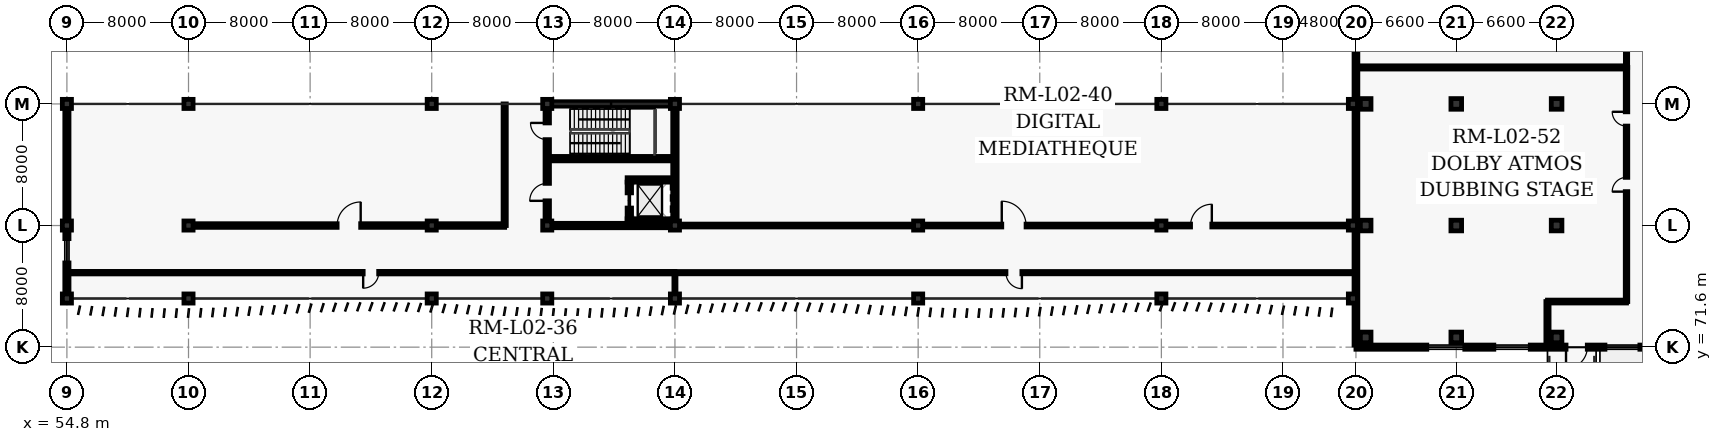
"""IFC4 building model, lengths in metres.
Left out: names, types, materials, properties, quantities, classifications, styles, units other than length and angle.
Written with IfcOpenShell. Run it as: python <this file> out.ifc"""

import sys

from ifc_helpers import new_model, si_unit, direction, frame, frame_2d, origin, origin_2d, place, context, subcontext, project, spatial, rectangle, extrude, element, fill, save


model = new_model("IFC4")
c1 = context("Model", 3, precision=1e-05, world=origin(), true_north=direction((0.0, 1.0)))
c2 = subcontext(c1, "Body", "Model", "MODEL_VIEW")
j1 = project(units=[si_unit("LENGTHUNIT", "METRE"), si_unit("PLANEANGLEUNIT", "RADIAN")], contexts=[c1])
p1 = place(None, origin())
s1 = spatial("IfcSite", under=j1, at=p1, CompositionType="ELEMENT")
p2 = place(p1, origin())
s2 = spatial("IfcBuilding", under=s1, at=p2, CompositionType="ELEMENT")
p3 = place(p2, frame((0.0, 0.0, 10.2)))
s3 = spatial("IfcBuildingStorey", under=s2, at=p3, CompositionType="ELEMENT", Elevation=10.2)
for number, where, z_axis, x_axis in (
    (1, (54.8, 74.8, 0.0), (0.0, 0.0, 1.0), (1.0, 0.0, 0.0)),
    (2, (54.8, 79.6, 0.0), (0.0, 0.0, 1.0), (1.0, 0.0, 0.0)),
    (3, (54.8, 87.6, 0.0), (0.0, 0.0, 1.0), (1.0, 0.0, 0.0)),
    (4, (62.8, 74.8, 0.0), (0.0, 0.0, 1.0), (1.0, 0.0, 0.0)),
    (5, (62.8, 79.6, 0.0), (0.0, 0.0, 1.0), (1.0, 0.0, 0.0)),
    (6, (62.8, 87.6, 0.0), (0.0, 0.0, 1.0), (1.0, 0.0, 0.0)),
    (7, (78.8, 74.8, 0.0), (0.0, 0.0, 1.0), (1.0, 0.0, 0.0)),
    (8, (78.8, 79.6, 0.0), (0.0, 0.0, 1.0), (1.0, 0.0, 0.0)),
    (9, (78.8, 87.6, 0.0), (0.0, 0.0, 1.0), (1.0, 0.0, 0.0)),
    (10, (86.4, 74.8, 0.0), (0.0, 0.0, 1.0), (1.0, 0.0, 0.0)),
    (11, (86.4, 79.6, 0.0), (0.0, 0.0, 1.0), (1.0, 0.0, 0.0)),
    (12, (86.4, 87.6, 0.0), (0.0, 0.0, 1.0), (1.0, 0.0, 0.0)),
    (13, (94.8, 74.8, 0.0), (0.0, 0.0, 1.0), (1.0, 0.0, 0.0)),
    (14, (94.8, 79.6, 0.0), (0.0, 0.0, 1.0), (1.0, 0.0, 0.0)),
    (15, (94.8, 87.6, 0.0), (0.0, 0.0, 1.0), (1.0, 0.0, 0.0)),
    (16, (110.8, 74.8, 0.0), (0.0, 0.0, 1.0), (1.0, 0.0, 0.0)),
    (17, (110.8, 79.6, 0.0), (0.0, 0.0, 1.0), (1.0, 0.0, 0.0)),
    (18, (110.8, 87.6, 0.0), (0.0, 0.0, 1.0), (1.0, 0.0, 0.0)),
    (19, (126.8, 74.8, 0.0), (0.0, 0.0, 1.0), (1.0, 0.0, 0.0)),
    (20, (126.8, 79.6, 0.0), (0.0, 0.0, 1.0), (1.0, 0.0, 0.0)),
    (21, (126.8, 87.6, 0.0), (0.0, 0.0, 1.0), (1.0, 0.0, 0.0)),
    (22, (139.4, 74.8, 0.0), (0.0, 0.0, 1.0), (1.0, 0.0, 0.0)),
    (23, (139.4, 79.6, 0.0), (0.0, 0.0, 1.0), (1.0, 0.0, 0.0)),
    (24, (139.4, 87.6, 0.0), (0.0, 0.0, 1.0), (1.0, 0.0, 0.0)),
):
    element("IfcColumn", number, at=place(p3, frame(where, z_axis=z_axis, x_axis=x_axis)), inside=s3, PredefinedType="COLUMN", context=c2, shape_type="SweptSolid", body=[
        extrude(rectangle(XDim=0.6, YDim=0.6, at=origin_2d()), origin(), (0.0, 0.0, 1.0), 5.4),
    ])
for number, where, z_axis, x_axis in (
    (25, (140.24, 72.24, 0.0), (0.0, 0.0, 1.0), (1.0, 0.0, 0.0)),
    (26, (140.24, 79.6, 0.0), (0.0, 0.0, 1.0), (1.0, 0.0, 0.0)),
    (27, (140.24, 87.6, 0.0), (0.0, 0.0, 1.0), (1.0, 0.0, 0.0)),
    (28, (146.2, 72.24, 0.0), (0.0, 0.0, 1.0), (1.0, 0.0, 0.0)),
    (29, (146.2, 79.6, 0.0), (0.0, 0.0, 1.0), (1.0, 0.0, 0.0)),
    (30, (146.2, 87.6, 0.0), (0.0, 0.0, 1.0), (1.0, 0.0, 0.0)),
    (31, (152.8, 72.24, 0.0), (0.0, 0.0, 1.0), (1.0, 0.0, 0.0)),
    (32, (152.8, 79.6, 0.0), (0.0, 0.0, 1.0), (1.0, 0.0, 0.0)),
    (33, (152.8, 87.6, 0.0), (0.0, 0.0, 1.0), (1.0, 0.0, 0.0)),
):
    element("IfcColumn", number, at=place(p3, frame(where, z_axis=z_axis, x_axis=x_axis)), inside=s3, PredefinedType="COLUMN", context=c2, shape_type="SweptSolid", body=[
        extrude(rectangle(XDim=0.7, YDim=0.7, at=origin_2d()), origin(), (0.0, 0.0, 1.0), 5.4),
    ])
p4 = place(p3, frame((54.8, 74.94, 0.0), z_axis=(0.0, 0.0, 1.0), x_axis=(0.0, 1.0, 0.0)))
e34 = element("IfcWall", 34, at=p4, inside=s3, PredefinedType="SOLIDWALL", context=c2, shape_type="SweptSolid", body=[
    extrude(rectangle(XDim=12.52, YDim=0.275, at=frame_2d((6.26, 0.0))), origin(), (0.0, 0.0, 1.0), 4.31),
])
p5 = place(p4, frame((2.2, 0.0, 0.8)))
e35 = element("IfcOpeningElement", 35, at=p5, cuts=e34, PredefinedType="OPENING", context=c2, shape_type="SweptSolid", body=[
    extrude(rectangle(XDim=1.6, YDim=1.65, at=frame_2d((0.8, 0.825))), frame((0.0, 0.147, 0.0), z_axis=(0.0, -1.0, 0.0), x_axis=(1.0, 0.0, 0.0)), (0.0, 0.0, 1.0), 0.295),
])
p6 = place(p3, frame((172.0, 71.6, 0.0), z_axis=(0.0, 0.0, 1.0), x_axis=(-1.0, 0.0, 0.0)))
e36 = element("IfcWall", 36, at=p6, inside=s3, PredefinedType="SOLIDWALL", context=c2, shape_type="SweptSolid", body=[
    extrude(rectangle(XDim=32.4, YDim=0.275, at=frame_2d((16.2, 0.0))), origin(), (0.0, 0.0, 1.0), 5.16),
])
p7 = place(p6, frame((7.96, 0.0, 0.8)))
e37 = element("IfcOpeningElement", 37, at=p7, cuts=e36, PredefinedType="OPENING", context=c2, shape_type="SweptSolid", body=[
    extrude(rectangle(XDim=2.2, YDim=2.25, at=frame_2d((1.1, 1.125))), frame((0.0, 0.147, 0.0), z_axis=(0.0, -1.0, 0.0), x_axis=(1.0, 0.0, 0.0)), (0.0, 0.0, 1.0), 0.295),
])
p8 = place(p6, frame((13.72, 0.0, 0.8)))
e38 = element("IfcOpeningElement", 38, at=p8, cuts=e36, PredefinedType="OPENING", context=c2, shape_type="SweptSolid", body=[
    extrude(rectangle(XDim=2.3, YDim=2.25, at=frame_2d((1.15, 1.125))), frame((0.0, 0.147, 0.0), z_axis=(0.0, -1.0, 0.0), x_axis=(1.0, 0.0, 0.0)), (0.0, 0.0, 1.0), 0.295),
])
p9 = place(p6, frame((20.93, 0.0, 0.8)))
e39 = element("IfcOpeningElement", 39, at=p9, cuts=e36, PredefinedType="OPENING", context=c2, shape_type="SweptSolid", body=[
    extrude(rectangle(XDim=2.4, YDim=2.3, at=frame_2d((1.2, 1.15))), frame((0.0, 0.147, 0.0), z_axis=(0.0, -1.0, 0.0), x_axis=(1.0, 0.0, 0.0)), (0.0, 0.0, 1.0), 0.295),
])
p10 = place(p6, frame((25.24, 0.0, 0.8)))
e40 = element("IfcOpeningElement", 40, at=p10, cuts=e36, PredefinedType="OPENING", context=c2, shape_type="SweptSolid", body=[
    extrude(rectangle(XDim=2.5, YDim=2.3, at=frame_2d((1.25, 1.15))), frame((0.0, 0.147, 0.0), z_axis=(0.0, -1.0, 0.0), x_axis=(1.0, 0.0, 0.0)), (0.0, 0.0, 1.0), 0.295),
])
p11 = place(p6, frame((17.18, 0.0, 0.0)))
e41 = element("IfcOpeningElement", 41, at=p11, cuts=e36, PredefinedType="OPENING", context=c2, shape_type="SweptSolid", body=[
    extrude(rectangle(XDim=1.4, YDim=2.25, at=frame_2d((0.7, 1.125))), frame((0.0, 0.147, 0.0), z_axis=(0.0, -1.0, 0.0), x_axis=(1.0, 0.0, 0.0)), (0.0, 0.0, 1.0), 0.295),
])
p12 = place(p3, frame((139.6, 71.74, 0.0), z_axis=(0.0, 0.0, 1.0), x_axis=(0.0, 1.0, 0.0)))
e42 = element("IfcWall", 42, at=p12, inside=s3, PredefinedType="SOLIDWALL", context=c2, shape_type="SweptSolid", body=[
    extrude(rectangle(XDim=46.12, YDim=0.25, at=frame_2d((23.06, 0.0))), origin(), (0.0, 0.0, 1.0), 4.31),
])
p13 = place(p12, frame((31.38, 0.0, 0.0)))
e43 = element("IfcOpeningElement", 43, at=p13, cuts=e42, PredefinedType="OPENING", context=c2, shape_type="SweptSolid", body=[
    extrude(rectangle(XDim=1.4, YDim=2.25, at=frame_2d((0.7, 1.125))), frame((0.0, 0.135, 0.0), z_axis=(0.0, -1.0, 0.0), x_axis=(1.0, 0.0, 0.0)), (0.0, 0.0, 1.0), 0.27),
])
for number, where, z_axis, x_axis in (
    (44, (86.702, 79.6, 0.0), (0.0, 0.0, 1.0), (1.0, 0.0, 0.0)),
    (45, (86.702, 87.6, 0.0), (0.0, 0.0, 1.0), (1.0, 0.0, 0.0)),
):
    element("IfcWall", number, at=place(p3, frame(where, z_axis=z_axis, x_axis=x_axis)), inside=s3, PredefinedType="SHEAR", context=c2, shape_type="SweptSolid", body=[
        extrude(rectangle(XDim=7.796, YDim=0.29, at=frame_2d((3.898, 0.0))), origin(), (0.0, 0.0, 1.0), 5.16),
    ])
p14 = place(p3, frame((86.4, 79.902, 0.0), z_axis=(0.0, 0.0, 1.0), x_axis=(0.0, 1.0, 0.0)))
e46 = element("IfcWall", 46, at=p14, inside=s3, PredefinedType="SHEAR", context=c2, shape_type="SweptSolid", body=[
    extrude(rectangle(XDim=7.396, YDim=0.29, at=frame_2d((3.698, 0.0))), origin(), (0.0, 0.0, 1.0), 5.16),
])
p15 = place(p14, frame((5.348, 0.0, 0.0)))
e47 = element("IfcOpeningElement", 47, at=p15, cuts=e46, PredefinedType="OPENING", context=c2, shape_type="SweptSolid", body=[
    extrude(rectangle(XDim=1.1, YDim=2.15, at=frame_2d((0.55, 1.075))), frame((0.0, 0.155, 0.0), z_axis=(0.0, -1.0, 0.0), x_axis=(1.0, 0.0, 0.0)), (0.0, 0.0, 1.0), 0.31),
])
p16 = place(p14, frame((1.323, 0.0, 0.0)))
e48 = element("IfcOpeningElement", 48, at=p16, cuts=e46, PredefinedType="OPENING", context=c2, shape_type="SweptSolid", body=[
    extrude(rectangle(XDim=1.15, YDim=2.2, at=frame_2d((0.575, 1.1))), frame((0.0, 0.155, 0.0), z_axis=(0.0, -1.0, 0.0), x_axis=(1.0, 0.0, 0.0)), (0.0, 0.0, 1.0), 0.31),
])
p17 = place(p3, frame((94.8, 79.902, 0.0), z_axis=(0.0, 0.0, 1.0), x_axis=(0.0, 1.0, 0.0)))
e49 = element("IfcWall", 49, at=p17, inside=s3, PredefinedType="SHEAR", context=c2, shape_type="SweptSolid", body=[
    extrude(rectangle(XDim=7.396, YDim=0.29, at=frame_2d((3.698, 0.0))), origin(), (0.0, 0.0, 1.0), 5.16),
])
p18 = place(p3, frame((86.545, 84.0, 0.0), z_axis=(0.0, 0.0, 1.0), x_axis=(1.0, 0.0, 0.0)))
e50 = element("IfcWall", 50, at=p18, inside=s3, PredefinedType="SHEAR", context=c2, shape_type="SweptSolid", body=[
    extrude(rectangle(XDim=8.11, YDim=0.29, at=frame_2d((4.055, 0.0))), origin(), (0.0, 0.0, 1.0), 5.16),
])
p19 = place(p3, frame((91.655, 79.9, 0.0), z_axis=(0.0, 0.0, 1.0), x_axis=(1.0, 0.0, 0.0)))
e51 = element("IfcWall", 51, at=p19, inside=s3, PredefinedType="SHEAR", context=c2, shape_type="SweptSolid", body=[
    extrude(rectangle(XDim=2.843, YDim=0.29, at=frame_2d((1.421, 0.0))), origin(), (0.0, 0.0, 1.0), 5.16),
])
p20 = place(p3, frame((91.655, 82.6, 0.0), z_axis=(0.0, 0.0, 1.0), x_axis=(1.0, 0.0, 0.0)))
e52 = element("IfcWall", 52, at=p20, inside=s3, PredefinedType="SHEAR", context=c2, shape_type="SweptSolid", body=[
    extrude(rectangle(XDim=2.99, YDim=0.29, at=frame_2d((1.495, 0.0))), origin(), (0.0, 0.0, 1.0), 5.16),
])
p21 = place(p3, frame((91.8, 80.045, 0.0), z_axis=(0.0, 0.0, 1.0), x_axis=(0.0, 1.0, 0.0)))
e53 = element("IfcWall", 53, at=p21, inside=s3, PredefinedType="SHEAR", context=c2, shape_type="SweptSolid", body=[
    extrude(rectangle(XDim=2.41, YDim=0.29, at=frame_2d((1.205, 0.0))), origin(), (0.0, 0.0, 1.0), 5.16),
])
p22 = place(p21, frame((0.705, 0.0, 0.0)))
e54 = element("IfcOpeningElement", 54, at=p22, cuts=e53, PredefinedType="OPENING", context=c2, shape_type="SweptSolid", body=[
    extrude(rectangle(XDim=1.0, YDim=2.15, at=frame_2d((0.5, 1.075))), frame((0.0, 0.155, 0.0), z_axis=(0.0, -1.0, 0.0), x_axis=(1.0, 0.0, 0.0)), (0.0, 0.0, 1.0), 0.31),
])
p23 = place(p3, frame((94.8, 76.5, 0.0), z_axis=(0.0, 0.0, 1.0), x_axis=(-1.0, 0.0, 0.0)))
e55 = element("IfcWall", 55, at=p23, inside=s3, PredefinedType="PARTITIONING", context=c2, shape_type="SweptSolid", body=[
    extrude(rectangle(XDim=40.0, YDim=0.165, at=frame_2d((20.0, 0.0))), origin(), (0.0, 0.0, 1.0), 5.16),
])
p24 = place(p23, frame((19.49, 0.0, 0.0)))
e56 = element("IfcOpeningElement", 56, at=p24, cuts=e55, PredefinedType="OPENING", context=c2, shape_type="SweptSolid", body=[
    extrude(rectangle(XDim=1.02, YDim=2.1, at=frame_2d((0.51, 1.05))), frame((0.0, 0.093, 0.0), z_axis=(0.0, -1.0, 0.0), x_axis=(1.0, 0.0, 0.0)), (0.0, 0.0, 1.0), 0.185),
])
p25 = place(p3, frame((139.4, 76.5, 0.0), z_axis=(0.0, 0.0, 1.0), x_axis=(-1.0, 0.0, 0.0)))
e57 = element("IfcWall", 57, at=p25, inside=s3, PredefinedType="PARTITIONING", context=c2, shape_type="SweptSolid", body=[
    extrude(rectangle(XDim=44.6, YDim=0.15, at=frame_2d((22.3, 0.0))), origin(), (0.0, 0.0, 1.0), 5.16),
])
p26 = place(p25, frame((21.775, 0.0, 0.0)))
e58 = element("IfcOpeningElement", 58, at=p26, cuts=e57, PredefinedType="OPENING", context=c2, shape_type="SweptSolid", body=[
    extrude(rectangle(XDim=1.05, YDim=2.15, at=frame_2d((0.525, 1.075))), frame((0.0, 0.085, 0.0), z_axis=(0.0, -1.0, 0.0), x_axis=(1.0, 0.0, 0.0)), (0.0, 0.0, 1.0), 0.17),
])
p27 = place(p3, frame((63.102, 79.6, 0.0), z_axis=(0.0, 0.0, 1.0), x_axis=(1.0, 0.0, 0.0)))
e59 = element("IfcWall", 59, at=p27, inside=s3, PredefinedType="PARTITIONING", context=c2, shape_type="SweptSolid", body=[
    extrude(rectangle(XDim=20.498, YDim=0.24, at=frame_2d((10.249, 0.0))), origin(), (0.0, 0.0, 1.0), 4.797),
])
p28 = place(p27, frame((9.474, 0.0, 0.0)))
e60 = element("IfcOpeningElement", 60, at=p28, cuts=e59, PredefinedType="OPENING", context=c2, shape_type="SweptSolid", body=[
    extrude(rectangle(XDim=1.55, YDim=2.25, at=frame_2d((0.775, 1.125))), frame((0.0, 0.13, 0.0), z_axis=(0.0, -1.0, 0.0), x_axis=(1.0, 0.0, 0.0)), (0.0, 0.0, 1.0), 0.26),
])
p29 = place(p3, frame((83.6, 79.6, 0.0), z_axis=(0.0, 0.0, 1.0), x_axis=(0.0, 1.0, 0.0)))
e61 = element("IfcWall", 61, at=p29, inside=s3, PredefinedType="PARTITIONING", context=c2, shape_type="SweptSolid", body=[
    extrude(rectangle(XDim=8.0, YDim=0.21, at=frame_2d((4.0, 0.0))), origin(), (0.0, 0.0, 1.0), 5.16),
])
p30 = place(p3, frame((95.102, 79.6, 0.0), z_axis=(0.0, 0.0, 1.0), x_axis=(1.0, 0.0, 0.0)))
e62 = element("IfcWall", 62, at=p30, inside=s3, PredefinedType="PARTITIONING", context=c2, shape_type="SweptSolid", body=[
    extrude(rectangle(XDim=43.996, YDim=0.19, at=frame_2d((21.998, 0.0))), origin(), (0.0, 0.0, 1.0), 4.51),
])
p31 = place(p30, frame((21.198, 0.0, 0.0)))
e63 = element("IfcOpeningElement", 63, at=p31, cuts=e62, PredefinedType="OPENING", context=c2, shape_type="SweptSolid", body=[
    extrude(rectangle(XDim=1.6, YDim=2.3, at=frame_2d((0.8, 1.15))), frame((0.0, 0.105, 0.0), z_axis=(0.0, -1.0, 0.0), x_axis=(1.0, 0.0, 0.0)), (0.0, 0.0, 1.0), 0.21),
])
p32 = place(p30, frame((33.617, 0.0, 0.0)))
e64 = element("IfcOpeningElement", 64, at=p32, cuts=e62, PredefinedType="OPENING", context=c2, shape_type="SweptSolid", body=[
    extrude(rectangle(XDim=1.4, YDim=2.25, at=frame_2d((0.7, 1.125))), frame((0.0, 0.105, 0.0), z_axis=(0.0, -1.0, 0.0), x_axis=(1.0, 0.0, 0.0)), (0.0, 0.0, 1.0), 0.21),
])
p33 = place(p3, frame((94.8, 76.5, 0.0), z_axis=(0.0, 0.0, 1.0), x_axis=(0.0, -1.0, 0.0)))
e65 = element("IfcWall", 65, at=p33, inside=s3, PredefinedType="PARTITIONING", context=c2, shape_type="SweptSolid", body=[
    extrude(rectangle(XDim=1.398, YDim=0.135, at=frame_2d((0.699, 0.0))), origin(), (0.0, 0.0, 1.0), 4.41),
])
p34 = place(p3, frame((152.2, 71.6, 0.0), z_axis=(0.0, 0.0, 1.0), x_axis=(0.0, 1.0, 0.0)))
e66 = element("IfcWall", 66, at=p34, inside=s3, PredefinedType="PARTITIONING", context=c2, shape_type="SweptSolid", body=[
    extrude(rectangle(XDim=3.0, YDim=0.21, at=frame_2d((1.5, 0.0))), origin(), (0.0, 0.0, 1.0), 5.16),
])
p35 = place(p3, frame((152.2, 74.6, 0.0), z_axis=(0.0, 0.0, 1.0), x_axis=(1.0, 0.0, 0.0)))
e67 = element("IfcWall", 67, at=p35, inside=s3, PredefinedType="PARTITIONING", context=c2, shape_type="SweptSolid", body=[
    extrude(rectangle(XDim=5.2, YDim=0.19, at=frame_2d((2.6, 0.0))), origin(), (0.0, 0.0, 1.0), 5.16),
])
p36 = place(p3, frame((157.4, 74.6, 0.0), z_axis=(0.0, 0.0, 1.0), x_axis=(0.0, 1.0, 0.0)))
e68 = element("IfcWall", 68, at=p36, inside=s3, PredefinedType="PARTITIONING", context=c2, shape_type="SweptSolid", body=[
    extrude(rectangle(XDim=15.4, YDim=0.165, at=frame_2d((7.7, 0.0))), origin(), (0.0, 0.0, 1.0), 5.16),
])
p37 = place(p36, frame((7.23, 0.0, 0.0)))
e69 = element("IfcOpeningElement", 69, at=p37, cuts=e68, PredefinedType="OPENING", context=c2, shape_type="SweptSolid", body=[
    extrude(rectangle(XDim=0.94, YDim=2.15, at=frame_2d((0.47, 1.075))), frame((0.0, 0.093, 0.0), z_axis=(0.0, -1.0, 0.0), x_axis=(1.0, 0.0, 0.0)), (0.0, 0.0, 1.0), 0.185),
])
p38 = place(p36, frame((11.542, 0.0, 0.0)))
e70 = element("IfcOpeningElement", 70, at=p38, cuts=e68, PredefinedType="OPENING", context=c2, shape_type="SweptSolid", body=[
    extrude(rectangle(XDim=0.94, YDim=2.15, at=frame_2d((0.47, 1.075))), frame((0.0, 0.093, 0.0), z_axis=(0.0, -1.0, 0.0), x_axis=(1.0, 0.0, 0.0)), (0.0, 0.0, 1.0), 0.185),
])
p39 = place(p3, frame((157.4, 90.0, 0.0), z_axis=(0.0, 0.0, 1.0), x_axis=(0.0, 1.0, 0.0)))
e71 = element("IfcWall", 71, at=p39, inside=s3, PredefinedType="PARTITIONING", context=c2, shape_type="SweptSolid", body=[
    extrude(rectangle(XDim=12.0, YDim=0.15, at=frame_2d((6.0, 0.0))), origin(), (0.0, 0.0, 1.0), 5.16),
])
p40 = place(p3, frame((139.6, 90.0, 0.0), z_axis=(0.0, 0.0, 1.0), x_axis=(1.0, 0.0, 0.0)))
e72 = element("IfcWall", 72, at=p40, inside=s3, PredefinedType="PARTITIONING", context=c2, shape_type="SweptSolid", body=[
    extrude(rectangle(XDim=17.8, YDim=0.21, at=frame_2d((8.9, 0.0))), origin(), (0.0, 0.0, 1.0), 5.16),
])
p41 = place(p5, origin())
e73 = element("IfcWindow", 73, at=p41, inside=s3, PartitioningType="SINGLE_PANEL", PredefinedType="WINDOW", context=c2, shape_type="SweptSolid", body=[
    extrude(rectangle(XDim=1.6, YDim=1.65, at=frame_2d((0.8, 0.825))), frame((0.0, 0.03, 0.0), z_axis=(0.0, -1.0, 0.0), x_axis=(1.0, 0.0, 0.0)), (0.0, 0.0, 1.0), 0.06),
])
fill(e35, e73)
p42 = place(p8, origin())
e74 = element("IfcWindow", 74, at=p42, inside=s3, PartitioningType="SINGLE_PANEL", PredefinedType="WINDOW", context=c2, shape_type="SweptSolid", body=[
    extrude(rectangle(XDim=2.3, YDim=2.25, at=frame_2d((1.15, 1.125))), frame((0.0, 0.03, 0.0), z_axis=(0.0, -1.0, 0.0), x_axis=(1.0, 0.0, 0.0)), (0.0, 0.0, 1.0), 0.06),
])
fill(e38, e74)
p43 = place(p9, origin())
e75 = element("IfcWindow", 75, at=p43, inside=s3, PartitioningType="SINGLE_PANEL", PredefinedType="WINDOW", context=c2, shape_type="SweptSolid", body=[
    extrude(rectangle(XDim=2.4, YDim=2.3, at=frame_2d((1.2, 1.15))), frame((0.0, 0.03, 0.0), z_axis=(0.0, -1.0, 0.0), x_axis=(1.0, 0.0, 0.0)), (0.0, 0.0, 1.0), 0.06),
])
fill(e39, e75)
p44 = place(p10, origin())
e76 = element("IfcWindow", 76, at=p44, inside=s3, PartitioningType="SINGLE_PANEL", PredefinedType="WINDOW", context=c2, shape_type="SweptSolid", body=[
    extrude(rectangle(XDim=2.5, YDim=2.3, at=frame_2d((1.25, 1.15))), frame((0.0, 0.03, 0.0), z_axis=(0.0, -1.0, 0.0), x_axis=(1.0, 0.0, 0.0)), (0.0, 0.0, 1.0), 0.06),
])
fill(e40, e76)
p45 = place(p15, origin())
e77 = element("IfcDoor", 77, at=p45, inside=s3, OperationType="SINGLE_SWING_RIGHT", PredefinedType="DOOR", context=c2, shape_type="SweptSolid", body=[
    extrude(rectangle(XDim=1.1, YDim=2.15, at=frame_2d((0.55, 1.075))), frame((0.0, 0.025, 0.0), z_axis=(0.0, -1.0, 0.0), x_axis=(1.0, 0.0, 0.0)), (0.0, 0.0, 1.0), 0.05),
])
fill(e47, e77)
p46 = place(p16, origin())
e78 = element("IfcDoor", 78, at=p46, inside=s3, OperationType="SINGLE_SWING_LEFT", PredefinedType="DOOR", context=c2, shape_type="SweptSolid", body=[
    extrude(rectangle(XDim=1.15, YDim=2.2, at=frame_2d((0.575, 1.1))), frame((0.0, 0.025, 0.0), z_axis=(0.0, -1.0, 0.0), x_axis=(1.0, 0.0, 0.0)), (0.0, 0.0, 1.0), 0.05),
])
fill(e48, e78)
p47 = place(p22, origin())
e79 = element("IfcDoor", 79, at=p47, inside=s3, OperationType="SLIDING_TO_LEFT", PredefinedType="DOOR", context=c2, shape_type="SweptSolid", body=[
    extrude(rectangle(XDim=1.0, YDim=2.15, at=frame_2d((0.5, 1.075))), frame((0.0, 0.025, 0.0), z_axis=(0.0, -1.0, 0.0), x_axis=(1.0, 0.0, 0.0)), (0.0, 0.0, 1.0), 0.05),
])
fill(e54, e79)
p48 = place(p11, origin())
e80 = element("IfcDoor", 80, at=p48, inside=s3, OperationType="SINGLE_SWING_RIGHT", PredefinedType="DOOR", context=c2, shape_type="SweptSolid", body=[
    extrude(rectangle(XDim=1.4, YDim=2.25, at=frame_2d((0.7, 1.125))), frame((0.0, 0.025, 0.0), z_axis=(0.0, -1.0, 0.0), x_axis=(1.0, 0.0, 0.0)), (0.0, 0.0, 1.0), 0.05),
])
fill(e41, e80)
p49 = place(p24, origin())
e81 = element("IfcDoor", 81, at=p49, inside=s3, OperationType="SINGLE_SWING_RIGHT", PredefinedType="DOOR", context=c2, shape_type="SweptSolid", body=[
    extrude(rectangle(XDim=1.02, YDim=2.1, at=frame_2d((0.51, 1.05))), frame((0.0, 0.025, 0.0), z_axis=(0.0, -1.0, 0.0), x_axis=(1.0, 0.0, 0.0)), (0.0, 0.0, 1.0), 0.05),
])
fill(e56, e81)
p50 = place(p26, origin())
e82 = element("IfcDoor", 82, at=p50, inside=s3, OperationType="SINGLE_SWING_LEFT", PredefinedType="DOOR", context=c2, shape_type="SweptSolid", body=[
    extrude(rectangle(XDim=1.05, YDim=2.15, at=frame_2d((0.525, 1.075))), frame((0.0, 0.025, 0.0), z_axis=(0.0, -1.0, 0.0), x_axis=(1.0, 0.0, 0.0)), (0.0, 0.0, 1.0), 0.05),
])
fill(e58, e82)
p51 = place(p28, origin())
e83 = element("IfcDoor", 83, at=p51, inside=s3, OperationType="SINGLE_SWING_RIGHT", PredefinedType="DOOR", context=c2, shape_type="SweptSolid", body=[
    extrude(rectangle(XDim=1.55, YDim=2.25, at=frame_2d((0.775, 1.125))), frame((0.0, 0.025, 0.0), z_axis=(0.0, -1.0, 0.0), x_axis=(1.0, 0.0, 0.0)), (0.0, 0.0, 1.0), 0.05),
])
fill(e60, e83)
p52 = place(p31, origin())
e84 = element("IfcDoor", 84, at=p52, inside=s3, OperationType="SINGLE_SWING_LEFT", PredefinedType="DOOR", context=c2, shape_type="SweptSolid", body=[
    extrude(rectangle(XDim=1.6, YDim=2.3, at=frame_2d((0.8, 1.15))), frame((0.0, 0.025, 0.0), z_axis=(0.0, -1.0, 0.0), x_axis=(1.0, 0.0, 0.0)), (0.0, 0.0, 1.0), 0.05),
])
fill(e63, e84)
p53 = place(p32, origin())
e85 = element("IfcDoor", 85, at=p53, inside=s3, OperationType="SINGLE_SWING_RIGHT", PredefinedType="DOOR", context=c2, shape_type="SweptSolid", body=[
    extrude(rectangle(XDim=1.4, YDim=2.25, at=frame_2d((0.7, 1.125))), frame((0.0, 0.025, 0.0), z_axis=(0.0, -1.0, 0.0), x_axis=(1.0, 0.0, 0.0)), (0.0, 0.0, 1.0), 0.05),
])
fill(e64, e85)
p54 = place(p37, origin())
e86 = element("IfcDoor", 86, at=p54, inside=s3, OperationType="SINGLE_SWING_LEFT", PredefinedType="DOOR", context=c2, shape_type="SweptSolid", body=[
    extrude(rectangle(XDim=0.94, YDim=2.15, at=frame_2d((0.47, 1.075))), frame((0.0, 0.025, 0.0), z_axis=(0.0, -1.0, 0.0), x_axis=(1.0, 0.0, 0.0)), (0.0, 0.0, 1.0), 0.05),
])
fill(e69, e86)
p55 = place(p38, origin())
e87 = element("IfcDoor", 87, at=p55, inside=s3, OperationType="SINGLE_SWING_RIGHT", PredefinedType="DOOR", context=c2, shape_type="SweptSolid", body=[
    extrude(rectangle(XDim=0.94, YDim=2.15, at=frame_2d((0.47, 1.075))), frame((0.0, 0.025, 0.0), z_axis=(0.0, -1.0, 0.0), x_axis=(1.0, 0.0, 0.0)), (0.0, 0.0, 1.0), 0.05),
])
fill(e70, e87)
save(model, sys.argv[1])
